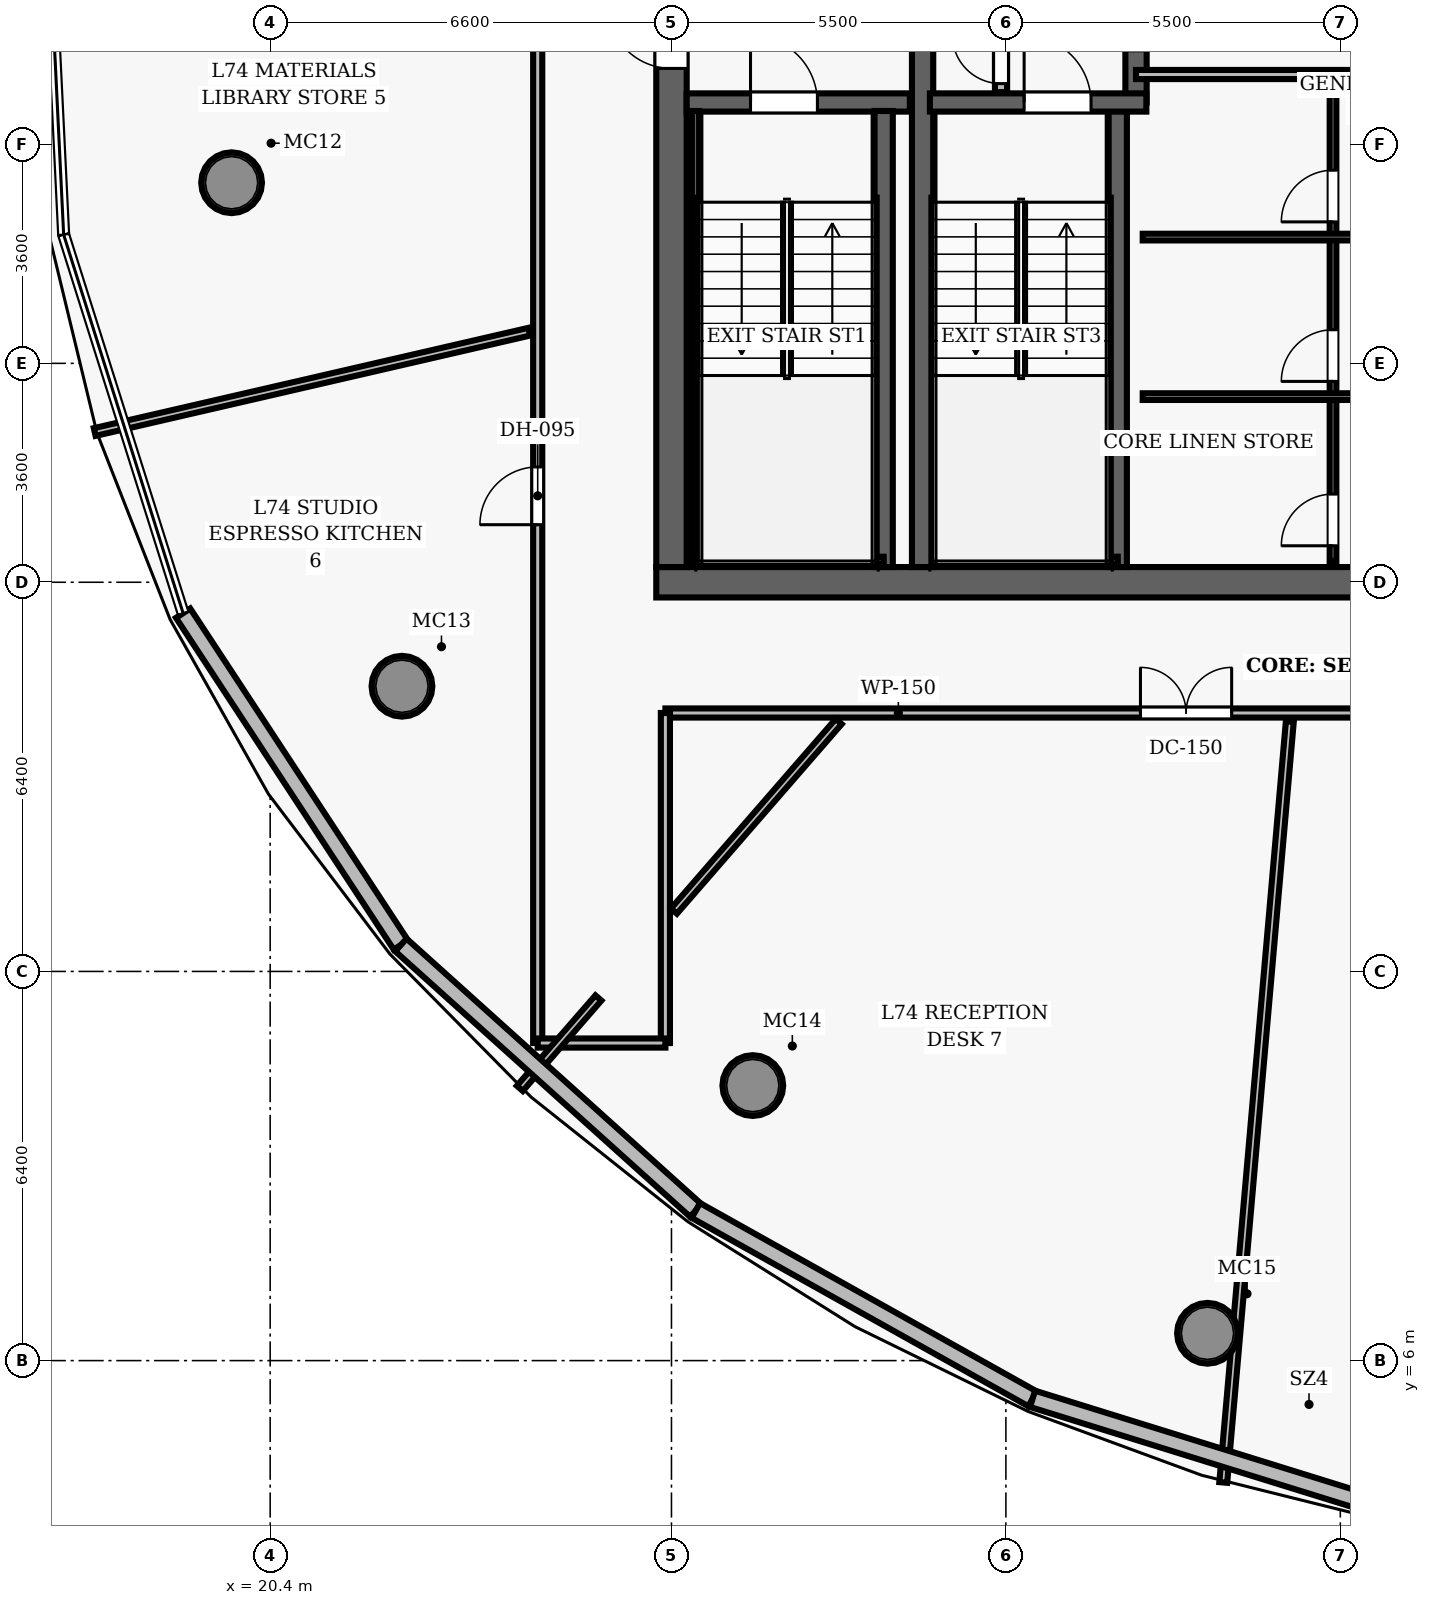
"""IFC4 building model, lengths in metres.
Left out: names, types, materials, properties, quantities, classifications, styles, units other than length and angle.
Written with IfcOpenShell. Run it as: python <this file> out.ifc"""

import sys

from ifc_helpers import new_model, si_unit, direction, frame, frame_2d, origin, origin_2d, place, context, subcontext, project, spatial, rectangle, hollow_circle, extrude, element, fill, save


model = new_model("IFC4")
c1 = context("Model", 3, precision=1e-05, world=origin(), true_north=direction((0.0, 1.0)))
c2 = subcontext(c1, "Body", "Model", "MODEL_VIEW")
j1 = project(units=[si_unit("LENGTHUNIT", "METRE"), si_unit("PLANEANGLEUNIT", "RADIAN")], contexts=[c1])
p1 = place(None, origin())
s1 = spatial("IfcSite", under=j1, at=p1, CompositionType="ELEMENT")
p2 = place(p1, origin())
s2 = spatial("IfcBuilding", under=s1, at=p2, CompositionType="ELEMENT")
p3 = place(p2, frame((0.0, 0.0, 292.1)))
s3 = spatial("IfcBuildingStorey", under=s2, at=p3, CompositionType="ELEMENT", Elevation=292.1)
p4 = place(p3, frame((26.75, 18.8, 0.0), z_axis=(0.0, 0.0, 1.0), x_axis=(1.0, 0.0, 0.0)))
e1 = element("IfcWall", 1, at=p4, inside=s3, PredefinedType="SHEAR", context=c2, shape_type="SweptSolid", body=[
    extrude(rectangle(XDim=22.5, YDim=0.5, at=frame_2d((11.25, 0.0))), origin(), (0.0, 0.0, 1.0), 3.85),
])
p5 = place(p4, frame((14.47, 0.0, 0.0)))
e2 = element("IfcOpeningElement", 2, at=p5, cuts=e1, PredefinedType="OPENING", context=c2, shape_type="SweptSolid", body=[
    extrude(rectangle(XDim=1.05, YDim=2.15, at=frame_2d((0.525, 1.075))), frame((0.0, 0.26, 0.0), z_axis=(0.0, -1.0, 0.0), x_axis=(1.0, 0.0, 0.0)), (0.0, 0.0, 1.0), 0.52),
])
p6 = place(p3, frame((27.0, 19.05, 0.0), z_axis=(0.0, 0.0, 1.0), x_axis=(0.0, 1.0, 0.0)))
e3 = element("IfcWall", 3, at=p6, inside=s3, PredefinedType="SHEAR", context=c2, shape_type="SweptSolid", body=[
    extrude(rectangle(XDim=13.9, YDim=0.5, at=frame_2d((6.95, 0.0))), origin(), (0.0, 0.0, 1.0), 3.85),
])
p7 = place(p6, frame((8.2, 0.0, 0.0)))
e4 = element("IfcOpeningElement", 4, at=p7, cuts=e3, PredefinedType="OPENING", context=c2, shape_type="SweptSolid", body=[
    extrude(rectangle(XDim=1.05, YDim=2.15, at=frame_2d((0.525, 1.075))), frame((0.0, 0.26, 0.0), z_axis=(0.0, -1.0, 0.0), x_axis=(1.0, 0.0, 0.0)), (0.0, 0.0, 1.0), 0.52),
])
p8 = place(p3, frame((31.13, 19.05, 0.0), z_axis=(0.0, 0.0, 1.0), x_axis=(0.0, 1.0, 0.0)))
e5 = element("IfcWall", 5, at=p8, inside=s3, PredefinedType="SHEAR", context=c2, shape_type="SweptSolid", body=[
    extrude(rectangle(XDim=13.9, YDim=0.35, at=frame_2d((6.95, 0.0))), origin(), (0.0, 0.0, 1.0), 3.85),
])
for number, where, z_axis, x_axis in (
    (6, (19.765, 25.371, 0.0), (0.0, 0.0, 1.0), (1.0, 0.0, 0.0)),
    (7, (22.567, 17.09, 0.0), (0.0, 0.0, 1.0), (1.0, 0.0, 0.0)),
    (8, (28.338, 10.523, 0.0), (0.0, 0.0, 1.0), (1.0, 0.0, 0.0)),
    (9, (35.815, 6.449, 0.0), (0.0, 0.0, 1.0), (1.0, 0.0, 0.0)),
):
    element("IfcColumn", number, at=place(p3, frame(where, z_axis=z_axis, x_axis=x_axis)), inside=s3, PredefinedType="COLUMN", context=c2, shape_type="SweptSolid", body=[
        extrude(hollow_circle(Radius=0.5, WallThickness=0.045, at=origin_2d()), origin(), (0.0, 0.0, 1.0), 3.85),
    ])
p9 = place(p3, frame((27.25, 26.69, 0.0), z_axis=(0.0, 0.0, 1.0), x_axis=(1.0, 0.0, 0.0)))
e10 = element("IfcWall", 10, at=p9, inside=s3, PredefinedType="SHEAR", context=c2, shape_type="SweptSolid", body=[
    extrude(rectangle(XDim=3.67, YDim=0.3, at=frame_2d((1.835, 0.0))), origin(), (0.0, 0.0, 1.0), 3.85),
])
p10 = place(p9, frame((1.05, 0.0, 0.0)))
e11 = element("IfcOpeningElement", 11, at=p10, cuts=e10, PredefinedType="OPENING", context=c2, shape_type="SweptSolid", body=[
    extrude(rectangle(XDim=1.1, YDim=2.15, at=frame_2d((0.55, 1.075))), frame((0.0, 0.16, 0.0), z_axis=(0.0, -1.0, 0.0), x_axis=(1.0, 0.0, 0.0)), (0.0, 0.0, 1.0), 0.32),
])
p11 = place(p3, frame((30.49, 19.05, 0.0), z_axis=(0.0, 0.0, 1.0), x_axis=(0.0, 1.0, 0.0)))
e12 = element("IfcWall", 12, at=p11, inside=s3, PredefinedType="SHEAR", context=c2, shape_type="SweptSolid", body=[
    extrude(rectangle(XDim=7.5, YDim=0.3, at=frame_2d((3.75, 0.0))), origin(), (0.0, 0.0, 1.0), 3.85),
])
p12 = place(p3, frame((27.395, 19.1, 0.0), z_axis=(0.0, 0.0, 1.0), x_axis=(0.0, 1.0, 0.0)))
e13 = element("IfcWall", 13, at=p12, inside=s3, PredefinedType="SHEAR", context=c2, shape_type="SweptSolid", body=[
    extrude(rectangle(XDim=7.45, YDim=0.12, at=frame_2d((3.725, 0.0))), origin(), (0.0, 0.0, 1.0), 3.85),
])
p13 = place(p3, frame((27.395, 19.16, 0.0), z_axis=(0.0, 0.0, 1.0), x_axis=(1.0, 0.0, 0.0)))
e14 = element("IfcWall", 14, at=p13, inside=s3, PredefinedType="SHEAR", context=c2, shape_type="SweptSolid", body=[
    extrude(rectangle(XDim=3.095, YDim=0.12, at=frame_2d((1.547, 0.0))), origin(), (0.0, 0.0, 1.0), 3.85),
])
p14 = place(p3, frame((34.34, 19.05, 0.0), z_axis=(0.0, 0.0, 1.0), x_axis=(0.0, 1.0, 0.0)))
e15 = element("IfcWall", 15, at=p14, inside=s3, PredefinedType="SHEAR", context=c2, shape_type="SweptSolid", body=[
    extrude(rectangle(XDim=7.5, YDim=0.3, at=frame_2d((3.75, 0.0))), origin(), (0.0, 0.0, 1.0), 3.85),
])
p15 = place(p3, frame((34.64, 26.69, 0.0), z_axis=(0.0, 0.0, 1.0), x_axis=(0.0, 1.0, 0.0)))
e16 = element("IfcWall", 16, at=p15, inside=s3, PredefinedType="SHEAR", context=c2, shape_type="SweptSolid", body=[
    extrude(rectangle(XDim=6.26, YDim=0.35, at=frame_2d((3.13, 0.0))), origin(), (0.0, 0.0, 1.0), 3.85),
])
p16 = place(p15, frame((0.85, 0.0, 0.0)))
e17 = element("IfcOpeningElement", 17, at=p16, cuts=e16, PredefinedType="OPENING", context=c2, shape_type="SweptSolid", body=[
    extrude(rectangle(XDim=1.05, YDim=2.15, at=frame_2d((0.525, 1.075))), frame((0.0, 0.185, 0.0), z_axis=(0.0, -1.0, 0.0), x_axis=(1.0, 0.0, 0.0)), (0.0, 0.0, 1.0), 0.37),
])
p17 = place(p3, frame((31.25, 26.69, 0.0), z_axis=(0.0, 0.0, 1.0), x_axis=(1.0, 0.0, 0.0)))
e18 = element("IfcWall", 18, at=p17, inside=s3, PredefinedType="SHEAR", context=c2, shape_type="SweptSolid", body=[
    extrude(rectangle(XDim=3.56, YDim=0.3, at=frame_2d((1.78, 0.0))), origin(), (0.0, 0.0, 1.0), 3.85),
])
p18 = place(p17, frame((1.55, 0.0, 0.0)))
e19 = element("IfcOpeningElement", 19, at=p18, cuts=e18, PredefinedType="OPENING", context=c2, shape_type="SweptSolid", body=[
    extrude(rectangle(XDim=1.1, YDim=2.15, at=frame_2d((0.55, 1.075))), frame((0.0, 0.16, 0.0), z_axis=(0.0, -1.0, 0.0), x_axis=(1.0, 0.0, 0.0)), (0.0, 0.0, 1.0), 0.32),
])
p19 = place(p3, frame((31.3, 19.16, 0.0), z_axis=(0.0, 0.0, 1.0), x_axis=(1.0, 0.0, 0.0)))
e20 = element("IfcWall", 20, at=p19, inside=s3, PredefinedType="SHEAR", context=c2, shape_type="SweptSolid", body=[
    extrude(rectangle(XDim=3.04, YDim=0.12, at=frame_2d((1.52, 0.0))), origin(), (0.0, 0.0, 1.0), 3.85),
])
p20 = place(p3, frame((32.42, 26.86, 0.0), z_axis=(0.0, 0.0, 1.0), x_axis=(0.0, 1.0, 0.0)))
e21 = element("IfcWall", 21, at=p20, inside=s3, PredefinedType="PARTITIONING", context=c2, shape_type="SweptSolid", body=[
    extrude(rectangle(XDim=2.04, YDim=0.2, at=frame_2d((1.02, 0.0))), origin(), (0.0, 0.0, 1.0), 3.04),
])
p21 = place(p20, frame((0.14, 0.0, 0.0)))
e22 = element("IfcOpeningElement", 22, at=p21, cuts=e21, PredefinedType="OPENING", context=c2, shape_type="SweptSolid", body=[
    extrude(rectangle(XDim=0.8, YDim=2.05, at=frame_2d((0.4, 1.025))), frame((0.0, 0.11, 0.0), z_axis=(0.0, -1.0, 0.0), x_axis=(1.0, 0.0, 0.0)), (0.0, 0.0, 1.0), 0.22),
])
p22 = place(p3, frame((34.64, 27.15, 0.0), z_axis=(0.0, 0.0, 1.0), x_axis=(1.0, 0.0, 0.0)))
e23 = element("IfcWall", 23, at=p22, inside=s3, PredefinedType="PARTITIONING", context=c2, shape_type="SweptSolid", body=[
    extrude(rectangle(XDim=6.36, YDim=0.15, at=frame_2d((3.18, 0.0))), origin(), (0.0, 0.0, 1.0), 3.04),
])
p23 = place(p3, frame((37.88, 19.15, 0.0), z_axis=(0.0, 0.0, 1.0), x_axis=(0.0, 1.0, 0.0)))
e24 = element("IfcWall", 24, at=p23, inside=s3, PredefinedType="PARTITIONING", context=c2, shape_type="SweptSolid", body=[
    extrude(rectangle(XDim=7.95, YDim=0.11, at=frame_2d((3.975, 0.0))), origin(), (0.0, 0.0, 1.0), 3.04),
])
p24 = place(p23, frame((0.25, 0.0, 0.0)))
e25 = element("IfcOpeningElement", 25, at=p24, cuts=e24, PredefinedType="OPENING", context=c2, shape_type="SweptSolid", body=[
    extrude(rectangle(XDim=0.85, YDim=2.1, at=frame_2d((0.425, 1.05))), frame((0.0, 0.065, 0.0), z_axis=(0.0, -1.0, 0.0), x_axis=(1.0, 0.0, 0.0)), (0.0, 0.0, 1.0), 0.13),
])
p25 = place(p23, frame((2.953, 0.0, 0.0)))
e26 = element("IfcOpeningElement", 26, at=p25, cuts=e24, PredefinedType="OPENING", context=c2, shape_type="SweptSolid", body=[
    extrude(rectangle(XDim=0.85, YDim=2.1, at=frame_2d((0.425, 1.05))), frame((0.0, 0.065, 0.0), z_axis=(0.0, -1.0, 0.0), x_axis=(1.0, 0.0, 0.0)), (0.0, 0.0, 1.0), 0.13),
])
p26 = place(p23, frame((5.576, 0.0, 0.0)))
e27 = element("IfcOpeningElement", 27, at=p26, cuts=e24, PredefinedType="OPENING", context=c2, shape_type="SweptSolid", body=[
    extrude(rectangle(XDim=0.85, YDim=2.1, at=frame_2d((0.425, 1.05))), frame((0.0, 0.065, 0.0), z_axis=(0.0, -1.0, 0.0), x_axis=(1.0, 0.0, 0.0)), (0.0, 0.0, 1.0), 0.13),
])
for number, where, z_axis, x_axis in (
    (28, (34.75, 21.853, 0.0), (0.0, 0.0, 1.0), (1.0, 0.0, 0.0)),
    (29, (34.75, 24.477, 0.0), (0.0, 0.0, 1.0), (1.0, 0.0, 0.0)),
):
    element("IfcWall", number, at=place(p3, frame(where, z_axis=z_axis, x_axis=x_axis)), inside=s3, PredefinedType="PARTITIONING", context=c2, shape_type="SweptSolid", body=[
        extrude(rectangle(XDim=6.25, YDim=0.11, at=frame_2d((3.125, 0.0))), origin(), (0.0, 0.0, 1.0), 3.04),
    ])
p27 = place(p3, frame((26.9, 16.65, 0.0), z_axis=(0.0, 0.0, 1.0), x_axis=(1.0, 0.0, 0.0)))
e30 = element("IfcWall", 30, at=p27, inside=s3, PredefinedType="PARTITIONING", context=c2, shape_type="SweptSolid", body=[
    extrude(rectangle(XDim=22.2, YDim=0.15, at=frame_2d((11.1, 0.0))), origin(), (0.0, 0.0, 1.0), 3.04),
])
p28 = place(p27, frame((7.813, 0.0, 0.0)))
e31 = element("IfcOpeningElement", 31, at=p28, cuts=e30, PredefinedType="OPENING", context=c2, shape_type="SweptSolid", body=[
    extrude(rectangle(XDim=1.5, YDim=2.2, at=frame_2d((0.75, 1.1))), frame((0.0, 0.085, 0.0), z_axis=(0.0, -1.0, 0.0), x_axis=(1.0, 0.0, 0.0)), (0.0, 0.0, 1.0), 0.17),
])
p29 = place(p27, frame((14.125, 0.0, 0.0)))
e32 = element("IfcOpeningElement", 32, at=p29, cuts=e30, PredefinedType="OPENING", context=c2, shape_type="SweptSolid", body=[
    extrude(rectangle(XDim=0.95, YDim=2.15, at=frame_2d((0.475, 1.075))), frame((0.0, 0.085, 0.0), z_axis=(0.0, -1.0, 0.0), x_axis=(1.0, 0.0, 0.0)), (0.0, 0.0, 1.0), 0.17),
])
p30 = place(p27, frame((17.741, 0.0, 0.0)))
e33 = element("IfcOpeningElement", 33, at=p30, cuts=e30, PredefinedType="OPENING", context=c2, shape_type="SweptSolid", body=[
    extrude(rectangle(XDim=1.5, YDim=2.2, at=frame_2d((0.75, 1.1))), frame((0.0, 0.085, 0.0), z_axis=(0.0, -1.0, 0.0), x_axis=(1.0, 0.0, 0.0)), (0.0, 0.0, 1.0), 0.17),
])
p31 = place(p3, frame((24.8, 11.222, 0.0), z_axis=(0.0, 0.0, 1.0), x_axis=(0.0, 1.0, 0.0)))
e34 = element("IfcWall", 34, at=p31, inside=s3, PredefinedType="PARTITIONING", context=c2, shape_type="SweptSolid", body=[
    extrude(rectangle(XDim=30.177, YDim=0.15, at=frame_2d((15.089, 0.0))), origin(), (0.0, 0.0, 1.0), 3.04),
])
p32 = place(p31, frame((17.923, 0.0, 0.0)))
e35 = element("IfcOpeningElement", 35, at=p32, cuts=e34, PredefinedType="OPENING", context=c2, shape_type="SweptSolid", body=[
    extrude(rectangle(XDim=0.95, YDim=2.15, at=frame_2d((0.475, 1.075))), frame((0.0, 0.085, 0.0), z_axis=(0.0, -1.0, 0.0), x_axis=(1.0, 0.0, 0.0)), (0.0, 0.0, 1.0), 0.17),
])
p33 = place(p31, frame((8.524, 0.0, 0.0)))
e36 = element("IfcOpeningElement", 36, at=p33, cuts=e34, PredefinedType="OPENING", context=c2, shape_type="SweptSolid", body=[
    extrude(rectangle(XDim=0.95, YDim=2.15, at=frame_2d((0.475, 1.075))), frame((0.0, 0.085, 0.0), z_axis=(0.0, -1.0, 0.0), x_axis=(1.0, 0.0, 0.0)), (0.0, 0.0, 1.0), 0.17),
])
p34 = place(p3, frame((26.9, 11.222, 0.0), z_axis=(0.0, 0.0, 1.0), x_axis=(0.0, 1.0, 0.0)))
e37 = element("IfcWall", 37, at=p34, inside=s3, PredefinedType="PARTITIONING", context=c2, shape_type="SweptSolid", body=[
    extrude(rectangle(XDim=5.427, YDim=0.15, at=frame_2d((2.714, 0.0))), origin(), (0.0, 0.0, 1.0), 3.04),
])
p35 = place(p3, frame((24.8, 11.222, 0.0), z_axis=(0.0, 0.0, 1.0), x_axis=(1.0, 0.0, 0.0)))
e38 = element("IfcWall", 38, at=p35, inside=s3, PredefinedType="PARTITIONING", context=c2, shape_type="SweptSolid", body=[
    extrude(rectangle(XDim=2.1, YDim=0.15, at=frame_2d((1.05, 0.0))), origin(), (0.0, 0.0, 1.0), 3.04),
])
p36 = place(p3, frame((24.66, 22.92, 0.0), z_axis=(0.0, 0.0, 1.0), x_axis=(-0.974372115757, -0.224942170425, 0.0)))
e39 = element("IfcWall", 39, at=p36, inside=s3, PredefinedType="PARTITIONING", context=c2, shape_type="SweptSolid", body=[
    extrude(rectangle(XDim=7.334, YDim=0.13, at=frame_2d((3.667, 0.0))), origin(), (0.0, 0.0, 1.0), 3.04),
])
p37 = place(p3, frame((29.75, 16.51, 0.0), z_axis=(0.0, 0.0, 1.0), x_axis=(-0.656070441922, -0.754699658961, 0.0)))
e40 = element("IfcWall", 40, at=p37, inside=s3, PredefinedType="PARTITIONING", context=c2, shape_type="SweptSolid", body=[
    extrude(rectangle(XDim=4.131, YDim=0.13, at=frame_2d((2.066, 0.0))), origin(), (0.0, 0.0, 1.0), 3.04),
])
p38 = place(p3, frame((25.798, 11.963, 0.0), z_axis=(0.0, 0.0, 1.0), x_axis=(-0.656123481739, -0.754653547471, 0.0)))
e41 = element("IfcWall", 41, at=p38, inside=s3, PredefinedType="PARTITIONING", context=c2, shape_type="SweptSolid", body=[
    extrude(rectangle(XDim=1.97, YDim=0.13, at=frame_2d((0.985, 0.0))), origin(), (0.0, 0.0, 1.0), 3.04),
])
p39 = place(p3, frame((37.17, 16.51, 0.0), z_axis=(0.0, 0.0, 1.0), x_axis=(-0.087144529253, -0.996195679082, 0.0)))
e42 = element("IfcWall", 42, at=p39, inside=s3, PredefinedType="PARTITIONING", context=c2, shape_type="SweptSolid", body=[
    extrude(rectangle(XDim=12.562, YDim=0.13, at=frame_2d((6.281, 0.0))), origin(), (0.0, 0.0, 1.0), 3.04),
])
p40 = place(p3, frame((22.55, 12.835, 0.0), z_axis=(0.0, 0.0, 1.0), x_axis=(-0.54877327346, 0.835971228175, 0.0)))
e43 = element("IfcWall", 43, at=p40, inside=s3, PredefinedType="SOLIDWALL", context=c2, shape_type="SweptSolid", body=[
    extrude(rectangle(XDim=6.527, YDim=0.28, at=frame_2d((3.263, 0.0))), origin(), (0.0, 0.0, 1.0), 3.625),
])
p41 = place(p3, frame((27.4, 8.469, 0.0), z_axis=(0.0, 0.0, 1.0), x_axis=(-0.743206714198, 0.669061865578, 0.0)))
e44 = element("IfcWall", 44, at=p41, inside=s3, PredefinedType="SOLIDWALL", context=c2, shape_type="SweptSolid", body=[
    extrude(rectangle(XDim=6.526, YDim=0.28, at=frame_2d((3.263, 0.0))), origin(), (0.0, 0.0, 1.0), 3.625),
])
p42 = place(p3, frame((32.938, 5.371, 0.0), z_axis=(0.0, 0.0, 1.0), x_axis=(-0.872743421577, 0.48817918851, 0.0)))
e45 = element("IfcWall", 45, at=p42, inside=s3, PredefinedType="SOLIDWALL", context=c2, shape_type="SweptSolid", body=[
    extrude(rectangle(XDim=6.345, YDim=0.28, at=frame_2d((3.173, 0.0))), origin(), (0.0, 0.0, 1.0), 3.625),
])
p43 = place(p3, frame((38.535, 3.634, 0.0), z_axis=(0.0, 0.0, 1.0), x_axis=(-0.955056409613, 0.296424112476, 0.0)))
e46 = element("IfcWall", 46, at=p43, inside=s3, PredefinedType="SOLIDWALL", context=c2, shape_type="SweptSolid", body=[
    extrude(rectangle(XDim=5.86, YDim=0.28, at=frame_2d((2.93, 0.0))), origin(), (0.0, 0.0, 1.0), 3.625),
])
p44 = place(p10, origin())
e47 = element("IfcDoor", 47, at=p44, inside=s3, OperationType="SINGLE_SWING_LEFT", PredefinedType="DOOR", context=c2, shape_type="SweptSolid", body=[
    extrude(rectangle(XDim=1.1, YDim=2.15, at=frame_2d((0.55, 1.075))), frame((0.0, 0.025, 0.0), z_axis=(0.0, -1.0, 0.0), x_axis=(1.0, 0.0, 0.0)), (0.0, 0.0, 1.0), 0.05),
])
fill(e11, e47)
p45 = place(p7, origin())
e48 = element("IfcDoor", 48, at=p45, inside=s3, OperationType="SINGLE_SWING_RIGHT", PredefinedType="DOOR", context=c2, shape_type="SweptSolid", body=[
    extrude(rectangle(XDim=1.05, YDim=2.15, at=frame_2d((0.525, 1.075))), frame((0.0, 0.025, 0.0), z_axis=(0.0, -1.0, 0.0), x_axis=(1.0, 0.0, 0.0)), (0.0, 0.0, 1.0), 0.05),
])
fill(e4, e48)
p46 = place(p18, origin())
e49 = element("IfcDoor", 49, at=p46, inside=s3, OperationType="SINGLE_SWING_LEFT", PredefinedType="DOOR", context=c2, shape_type="SweptSolid", body=[
    extrude(rectangle(XDim=1.1, YDim=2.15, at=frame_2d((0.55, 1.075))), frame((0.0, 0.025, 0.0), z_axis=(0.0, -1.0, 0.0), x_axis=(1.0, 0.0, 0.0)), (0.0, 0.0, 1.0), 0.05),
])
fill(e19, e49)
p47 = place(p21, origin())
e50 = element("IfcDoor", 50, at=p47, inside=s3, OperationType="SINGLE_SWING_RIGHT", PredefinedType="DOOR", context=c2, shape_type="SweptSolid", body=[
    extrude(rectangle(XDim=0.8, YDim=2.05, at=frame_2d((0.4, 1.025))), frame((0.0, 0.025, 0.0), z_axis=(0.0, -1.0, 0.0), x_axis=(1.0, 0.0, 0.0)), (0.0, 0.0, 1.0), 0.05),
])
fill(e22, e50)
p48 = place(p24, origin())
e51 = element("IfcDoor", 51, at=p48, inside=s3, OperationType="SINGLE_SWING_LEFT", PredefinedType="DOOR", context=c2, shape_type="SweptSolid", body=[
    extrude(rectangle(XDim=0.85, YDim=2.1, at=frame_2d((0.425, 1.05))), frame((0.0, 0.025, 0.0), z_axis=(0.0, -1.0, 0.0), x_axis=(1.0, 0.0, 0.0)), (0.0, 0.0, 1.0), 0.05),
])
fill(e25, e51)
p49 = place(p25, origin())
e52 = element("IfcDoor", 52, at=p49, inside=s3, OperationType="SINGLE_SWING_LEFT", PredefinedType="DOOR", context=c2, shape_type="SweptSolid", body=[
    extrude(rectangle(XDim=0.85, YDim=2.1, at=frame_2d((0.425, 1.05))), frame((0.0, 0.025, 0.0), z_axis=(0.0, -1.0, 0.0), x_axis=(1.0, 0.0, 0.0)), (0.0, 0.0, 1.0), 0.05),
])
fill(e26, e52)
p50 = place(p26, origin())
e53 = element("IfcDoor", 53, at=p50, inside=s3, OperationType="SINGLE_SWING_LEFT", PredefinedType="DOOR", context=c2, shape_type="SweptSolid", body=[
    extrude(rectangle(XDim=0.85, YDim=2.1, at=frame_2d((0.425, 1.05))), frame((0.0, 0.025, 0.0), z_axis=(0.0, -1.0, 0.0), x_axis=(1.0, 0.0, 0.0)), (0.0, 0.0, 1.0), 0.05),
])
fill(e27, e53)
p51 = place(p33, origin())
e54 = element("IfcDoor", 54, at=p51, inside=s3, OperationType="SINGLE_SWING_LEFT", PredefinedType="DOOR", context=c2, shape_type="SweptSolid", body=[
    extrude(rectangle(XDim=0.95, YDim=2.15, at=frame_2d((0.475, 1.075))), frame((0.0, 0.025, 0.0), z_axis=(0.0, -1.0, 0.0), x_axis=(1.0, 0.0, 0.0)), (0.0, 0.0, 1.0), 0.05),
])
fill(e36, e54)
p52 = place(p28, origin())
e55 = element("IfcDoor", 55, at=p52, inside=s3, OperationType="DOUBLE_DOOR_SINGLE_SWING", PredefinedType="DOOR", context=c2, shape_type="SweptSolid", body=[
    extrude(rectangle(XDim=1.5, YDim=2.2, at=frame_2d((0.75, 1.1))), frame((0.0, 0.025, 0.0), z_axis=(0.0, -1.0, 0.0), x_axis=(1.0, 0.0, 0.0)), (0.0, 0.0, 1.0), 0.05),
])
fill(e31, e55)
save(model, sys.argv[1])
